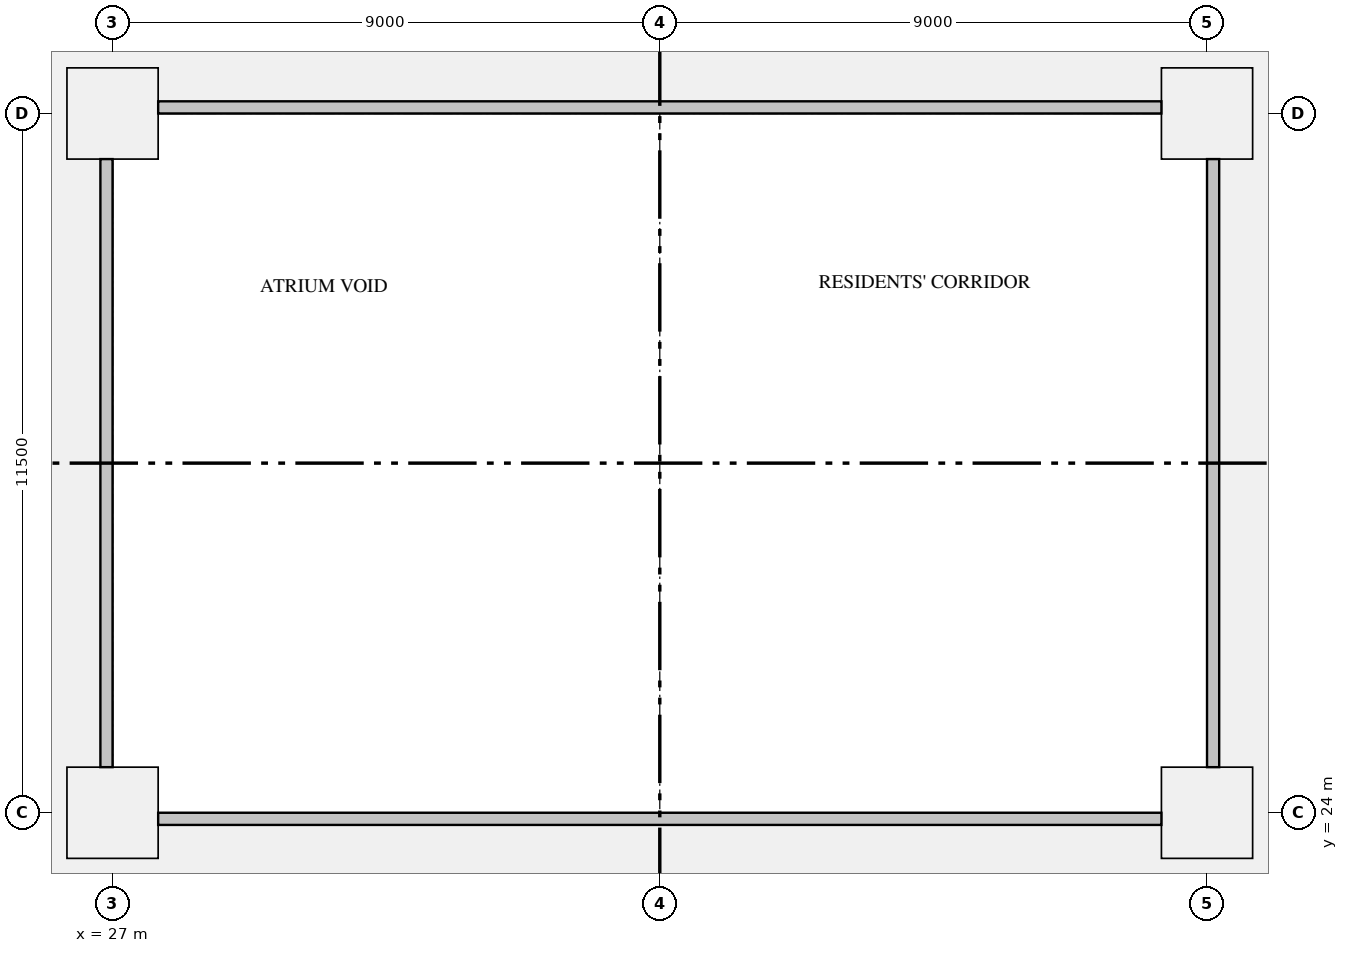
"""IFC4 building model, lengths in metres.
Left out: names, types, materials, properties, quantities, classifications, styles, units other than length and angle.
Written with IfcOpenShell. Run it as: python <this file> out.ifc"""

import sys

from ifc_helpers import new_model, si_unit, direction, frame, origin, origin_2d, place, context, subcontext, project, spatial, rectangle, extrude, element, save


model = new_model("IFC4")
c1 = context("Model", 3, precision=1e-05, world=origin(), true_north=direction((0.0, 1.0)))
c2 = subcontext(c1, "Body", "Model", "MODEL_VIEW")
j1 = project(units=[si_unit("LENGTHUNIT", "METRE"), si_unit("PLANEANGLEUNIT", "RADIAN")], contexts=[c1])
p1 = place(None, origin())
s1 = spatial("IfcSite", under=j1, at=p1, CompositionType="ELEMENT")
p2 = place(p1, origin())
s2 = spatial("IfcBuilding", under=s1, at=p2, CompositionType="ELEMENT")
p3 = place(p2, frame((0.0, 0.0, 47.85)))
s3 = spatial("IfcBuildingStorey", under=s2, at=p3, CompositionType="ELEMENT", Elevation=47.85)
for number, where, z_axis, x_axis in (
    (1, (27.0, 24.0, 0.0), (0.0, 0.0, 1.0), (1.0, 0.0, 0.0)),
    (2, (45.0, 24.0, 0.0), (0.0, 0.0, 1.0), (1.0, 0.0, 0.0)),
    (3, (27.0, 35.5, 0.0), (0.0, 0.0, 1.0), (1.0, 0.0, 0.0)),
    (4, (45.0, 35.5, 0.0), (0.0, 0.0, 1.0), (1.0, 0.0, 0.0)),
):
    element("IfcColumn", number, at=place(p3, frame(where, z_axis=z_axis, x_axis=x_axis)), inside=s3, PredefinedType="COLUMN", context=c2, shape_type="SweptSolid", body=[
        extrude(rectangle(XDim=1.5, YDim=1.5, at=origin_2d()), origin(), (0.0, 0.0, 1.0), 3.15),
    ])
save(model, sys.argv[1])
